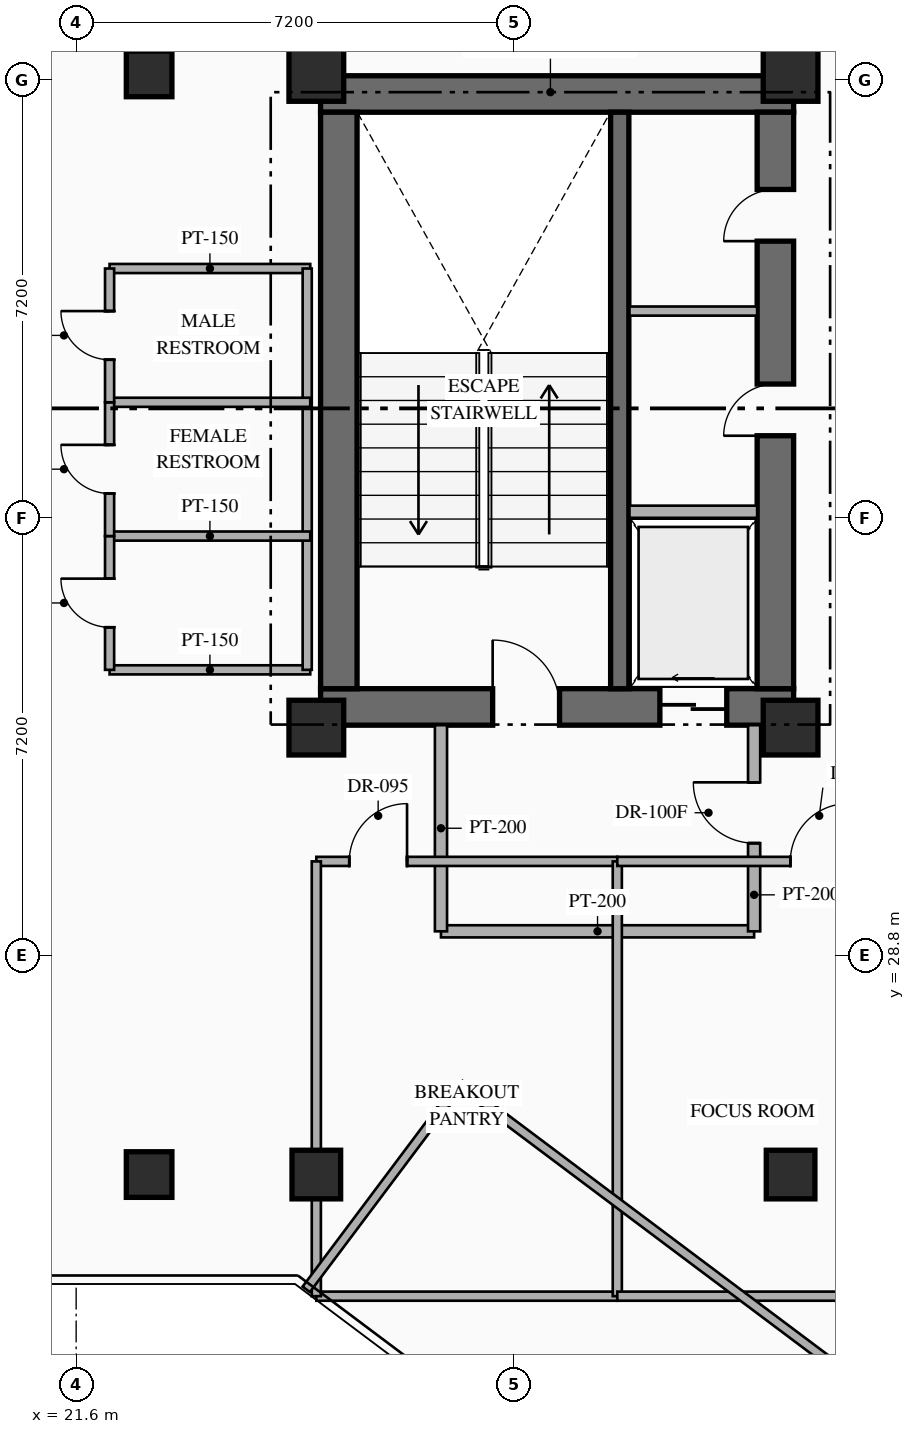
"""IFC4 building model, lengths in metres.
Left out: names, types, materials, properties, quantities, classifications, styles, units other than length and angle.
Written with IfcOpenShell. Run it as: python <this file> out.ifc"""

import sys

from ifc_helpers import new_model, si_unit, direction, frame, frame_2d, origin, origin_2d, place, context, subcontext, project, spatial, rectangle, hollow_rectangle, extrude, element, fill, save


model = new_model("IFC4")
c1 = context("Model", 3, precision=1e-05, world=origin(), true_north=direction((0.0, 1.0)))
c2 = subcontext(c1, "Body", "Model", "MODEL_VIEW")
j1 = project(units=[si_unit("LENGTHUNIT", "METRE"), si_unit("PLANEANGLEUNIT", "RADIAN")], contexts=[c1])
p1 = place(None, origin())
s1 = spatial("IfcSite", under=j1, at=p1, CompositionType="ELEMENT")
p2 = place(p1, origin())
s2 = spatial("IfcBuilding", under=s1, at=p2, CompositionType="ELEMENT")
p3 = place(p2, frame((0.0, 0.0, 178.05)))
s3 = spatial("IfcBuildingStorey", under=s2, at=p3, CompositionType="ELEMENT", Elevation=178.05)
p4 = place(p3, frame((25.62, 32.89, 0.0), z_axis=(0.0, 0.0, 1.0), x_axis=(1.0, 0.0, 0.0)))
e1 = element("IfcWall", 1, at=p4, inside=s3, PredefinedType="SHEAR", context=c2, shape_type="SweptSolid", body=[
    extrude(rectangle(XDim=7.78, YDim=0.6, at=frame_2d((3.89, 0.0))), origin(), (0.0, 0.0, 1.0), 3.6),
])
p5 = place(p4, frame((2.83, 0.0, 0.0)))
e2 = element("IfcOpeningElement", 2, at=p5, cuts=e1, PredefinedType="OPENING", context=c2, shape_type="SweptSolid", body=[
    extrude(rectangle(XDim=1.1, YDim=2.2, at=frame_2d((0.55, 1.1))), frame((0.0, 0.31, 0.0), z_axis=(0.0, -1.0, 0.0), x_axis=(1.0, 0.0, 0.0)), (0.0, 0.0, 1.0), 0.62),
])
p6 = place(p4, frame((5.58, 0.0, 0.0)))
e3 = element("IfcOpeningElement", 3, at=p6, cuts=e1, PredefinedType="OPENING", context=c2, shape_type="SweptSolid", body=[
    extrude(rectangle(XDim=1.1, YDim=2.15, at=frame_2d((0.55, 1.075))), frame((0.0, 0.31, 0.0), z_axis=(0.0, -1.0, 0.0), x_axis=(1.0, 0.0, 0.0)), (0.0, 0.0, 1.0), 0.62),
])
p7 = place(p3, frame((25.62, 42.97, 0.0), z_axis=(0.0, 0.0, 1.0), x_axis=(1.0, 0.0, 0.0)))
e4 = element("IfcWall", 4, at=p7, inside=s3, PredefinedType="SHEAR", context=c2, shape_type="SweptSolid", body=[
    extrude(rectangle(XDim=7.78, YDim=0.6, at=frame_2d((3.89, 0.0))), origin(), (0.0, 0.0, 1.0), 3.6),
])
p8 = place(p3, frame((25.92, 33.19, 0.0), z_axis=(0.0, 0.0, 1.0), x_axis=(0.0, 1.0, 0.0)))
e5 = element("IfcWall", 5, at=p8, inside=s3, PredefinedType="SHEAR", context=c2, shape_type="SweptSolid", body=[
    extrude(rectangle(XDim=9.48, YDim=0.6, at=frame_2d((4.74, 0.0))), origin(), (0.0, 0.0, 1.0), 3.6),
])
p9 = place(p3, frame((33.1, 33.19, 0.0), z_axis=(0.0, 0.0, 1.0), x_axis=(0.0, 1.0, 0.0)))
e6 = element("IfcWall", 6, at=p9, inside=s3, PredefinedType="SHEAR", context=c2, shape_type="SweptSolid", body=[
    extrude(rectangle(XDim=9.48, YDim=0.6, at=frame_2d((4.74, 0.0))), origin(), (0.0, 0.0, 1.0), 3.6),
])
p10 = place(p9, frame((4.16, 0.0, 0.0)))
e7 = element("IfcOpeningElement", 7, at=p10, cuts=e6, PredefinedType="OPENING", context=c2, shape_type="SweptSolid", body=[
    extrude(rectangle(XDim=0.85, YDim=2.08, at=frame_2d((0.425, 1.04))), frame((0.0, 0.31, 0.0), z_axis=(0.0, -1.0, 0.0), x_axis=(1.0, 0.0, 0.0)), (0.0, 0.0, 1.0), 0.62),
])
p11 = place(p9, frame((7.36, 0.0, 0.0)))
e8 = element("IfcOpeningElement", 8, at=p11, cuts=e6, PredefinedType="OPENING", context=c2, shape_type="SweptSolid", body=[
    extrude(rectangle(XDim=0.85, YDim=2.08, at=frame_2d((0.425, 1.04))), frame((0.0, 0.31, 0.0), z_axis=(0.0, -1.0, 0.0), x_axis=(1.0, 0.0, 0.0)), (0.0, 0.0, 1.0), 0.62),
])
p12 = place(p3, frame((30.54, 33.19, 0.0), z_axis=(0.0, 0.0, 1.0), x_axis=(0.0, 1.0, 0.0)))
e9 = element("IfcWall", 9, at=p12, inside=s3, PredefinedType="SHEAR", context=c2, shape_type="SweptSolid", body=[
    extrude(rectangle(XDim=9.48, YDim=0.3, at=frame_2d((4.74, 0.0))), origin(), (0.0, 0.0, 1.0), 3.6),
])
for number, where, z_axis, x_axis in (
    (10, (25.55, 32.55, 0.0), (0.0, 0.0, 1.0), (1.0, 0.0, 0.0)),
    (11, (33.35, 32.55, 0.0), (0.0, 0.0, 1.0), (1.0, 0.0, 0.0)),
    (12, (25.55, 43.3, 0.0), (0.0, 0.0, 1.0), (1.0, 0.0, 0.0)),
    (13, (33.35, 43.3, 0.0), (0.0, 0.0, 1.0), (1.0, 0.0, 0.0)),
):
    element("IfcColumn", number, at=place(p3, frame(where, z_axis=z_axis, x_axis=x_axis)), inside=s3, PredefinedType="COLUMN", context=c2, shape_type="SweptSolid", body=[
        extrude(rectangle(XDim=0.9, YDim=0.9, at=origin_2d()), origin(), (0.0, 0.0, 1.0), 3.6),
    ])
for number, where, z_axis, x_axis in (
    (14, (25.55, 25.2, 0.0), (0.0, 0.0, 1.0), (1.0, 0.0, 0.0)),
    (15, (33.35, 25.2, 0.0), (0.0, 0.0, 1.0), (1.0, 0.0, 0.0)),
):
    element("IfcColumn", number, at=place(p3, frame(where, z_axis=z_axis, x_axis=x_axis)), inside=s3, PredefinedType="COLUMN", context=c2, shape_type="SweptSolid", body=[
        extrude(hollow_rectangle(XDim=0.8, YDim=0.8, WallThickness=0.032, at=origin_2d()), origin(), (0.0, 0.0, 1.0), 3.6),
    ])
for number, where, z_axis, x_axis in (
    (16, (22.8, 25.2, 0.0), (0.0, 0.0, 1.0), (1.0, 0.0, 0.0)),
    (17, (22.8, 43.3, 0.0), (0.0, 0.0, 1.0), (1.0, 0.0, 0.0)),
):
    element("IfcColumn", number, at=place(p3, frame(where, z_axis=z_axis, x_axis=x_axis)), inside=s3, PredefinedType="COLUMN", context=c2, shape_type="SweptSolid", body=[
        extrude(hollow_rectangle(XDim=0.75, YDim=0.75, WallThickness=0.028, at=origin_2d()), origin(), (0.0, 0.0, 1.0), 3.6),
    ])
p13 = place(p3, frame((30.7, 36.1, 0.0), z_axis=(0.0, 0.0, 1.0), x_axis=(1.0, 0.0, 0.0)))
e18 = element("IfcWall", 18, at=p13, inside=s3, PredefinedType="STANDARD", context=c2, shape_type="SweptSolid", body=[
    extrude(rectangle(XDim=2.1, YDim=0.2, at=frame_2d((1.05, 0.0))), origin(), (0.0, 0.0, 1.0), 3.3),
])
p14 = place(p3, frame((30.7, 39.4, 0.0), z_axis=(0.0, 0.0, 1.0), x_axis=(1.0, 0.0, 0.0)))
e19 = element("IfcWall", 19, at=p14, inside=s3, PredefinedType="PARTITIONING", context=c2, shape_type="SweptSolid", body=[
    extrude(rectangle(XDim=2.1, YDim=0.15, at=frame_2d((1.05, 0.0))), origin(), (0.0, 0.0, 1.0), 3.3),
])
p15 = place(p3, frame((27.6, 29.2, 0.0), z_axis=(0.0, 0.0, 1.0), x_axis=(1.0, 0.0, 0.0)))
e20 = element("IfcWall", 20, at=p15, inside=s3, PredefinedType="STANDARD", context=c2, shape_type="SweptSolid", body=[
    extrude(rectangle(XDim=5.15, YDim=0.2, at=frame_2d((2.575, 0.0))), origin(), (0.0, 0.0, 1.0), 3.3),
])
p16 = place(p3, frame((27.6, 29.2, 0.0), z_axis=(0.0, 0.0, 1.0), x_axis=(0.0, 1.0, 0.0)))
e21 = element("IfcWall", 21, at=p16, inside=s3, PredefinedType="STANDARD", context=c2, shape_type="SweptSolid", body=[
    extrude(rectangle(XDim=3.39, YDim=0.2, at=frame_2d((1.695, 0.0))), origin(), (0.0, 0.0, 1.0), 3.3),
])
p17 = place(p3, frame((32.75, 29.2, 0.0), z_axis=(0.0, 0.0, 1.0), x_axis=(0.0, 1.0, 0.0)))
e22 = element("IfcWall", 22, at=p17, inside=s3, PredefinedType="STANDARD", context=c2, shape_type="SweptSolid", body=[
    extrude(rectangle(XDim=3.39, YDim=0.2, at=frame_2d((1.695, 0.0))), origin(), (0.0, 0.0, 1.0), 3.3),
])
p18 = place(p17, frame((1.45, 0.0, 0.0)))
e23 = element("IfcOpeningElement", 23, at=p18, cuts=e22, PredefinedType="OPENING", context=c2, shape_type="SweptSolid", body=[
    extrude(rectangle(XDim=1.0, YDim=2.2, at=frame_2d((0.5, 1.1))), frame((0.0, 0.11, 0.0), z_axis=(0.0, -1.0, 0.0), x_axis=(1.0, 0.0, 0.0)), (0.0, 0.0, 1.0), 0.22),
])
for number, where, z_axis, x_axis in (
    (24, (22.15, 33.5, 0.0), (0.0, 0.0, 1.0), (1.0, 0.0, 0.0)),
    (25, (22.15, 40.1, 0.0), (0.0, 0.0, 1.0), (1.0, 0.0, 0.0)),
):
    element("IfcWall", number, at=place(p3, frame(where, z_axis=z_axis, x_axis=x_axis)), inside=s3, PredefinedType="PARTITIONING", context=c2, shape_type="SweptSolid", body=[
        extrude(rectangle(XDim=3.3, YDim=0.15, at=frame_2d((1.65, 0.0))), origin(), (0.0, 0.0, 1.0), 3.3),
    ])
p19 = place(p3, frame((25.4, 33.5, 0.0), z_axis=(0.0, 0.0, 1.0), x_axis=(0.0, 1.0, 0.0)))
e26 = element("IfcWall", 26, at=p19, inside=s3, PredefinedType="PARTITIONING", context=c2, shape_type="SweptSolid", body=[
    extrude(rectangle(XDim=6.6, YDim=0.15, at=frame_2d((3.3, 0.0))), origin(), (0.0, 0.0, 1.0), 3.3),
])
for number, where, z_axis, x_axis in (
    (27, (22.15, 35.7, 0.0), (0.0, 0.0, 1.0), (1.0, 0.0, 0.0)),
    (28, (22.15, 37.9, 0.0), (0.0, 0.0, 1.0), (1.0, 0.0, 0.0)),
):
    element("IfcWall", number, at=place(p3, frame(where, z_axis=z_axis, x_axis=x_axis)), inside=s3, PredefinedType="PARTITIONING", context=c2, shape_type="SweptSolid", body=[
        extrude(rectangle(XDim=3.3, YDim=0.15, at=frame_2d((1.65, 0.0))), origin(), (0.0, 0.0, 1.0), 3.3),
    ])
p20 = place(p3, frame((22.15, 33.5, 0.0), z_axis=(0.0, 0.0, 1.0), x_axis=(0.0, 1.0, 0.0)))
e29 = element("IfcWall", 29, at=p20, inside=s3, PredefinedType="PARTITIONING", context=c2, shape_type="SweptSolid", body=[
    extrude(rectangle(XDim=2.2, YDim=0.15, at=frame_2d((1.1, 0.0))), origin(), (0.0, 0.0, 1.0), 3.3),
])
p21 = place(p20, frame((0.7, 0.0, 0.0)))
e30 = element("IfcOpeningElement", 30, at=p21, cuts=e29, PredefinedType="OPENING", context=c2, shape_type="SweptSolid", body=[
    extrude(rectangle(XDim=0.8, YDim=2.06, at=frame_2d((0.4, 1.03))), frame((0.0, 0.085, 0.0), z_axis=(0.0, -1.0, 0.0), x_axis=(1.0, 0.0, 0.0)), (0.0, 0.0, 1.0), 0.17),
])
p22 = place(p3, frame((22.15, 35.7, 0.0), z_axis=(0.0, 0.0, 1.0), x_axis=(0.0, 1.0, 0.0)))
e31 = element("IfcWall", 31, at=p22, inside=s3, PredefinedType="PARTITIONING", context=c2, shape_type="SweptSolid", body=[
    extrude(rectangle(XDim=2.2, YDim=0.15, at=frame_2d((1.1, 0.0))), origin(), (0.0, 0.0, 1.0), 3.3),
])
p23 = place(p22, frame((0.7, 0.0, 0.0)))
e32 = element("IfcOpeningElement", 32, at=p23, cuts=e31, PredefinedType="OPENING", context=c2, shape_type="SweptSolid", body=[
    extrude(rectangle(XDim=0.8, YDim=2.06, at=frame_2d((0.4, 1.03))), frame((0.0, 0.085, 0.0), z_axis=(0.0, -1.0, 0.0), x_axis=(1.0, 0.0, 0.0)), (0.0, 0.0, 1.0), 0.17),
])
p24 = place(p3, frame((22.15, 37.9, 0.0), z_axis=(0.0, 0.0, 1.0), x_axis=(0.0, 1.0, 0.0)))
e33 = element("IfcWall", 33, at=p24, inside=s3, PredefinedType="PARTITIONING", context=c2, shape_type="SweptSolid", body=[
    extrude(rectangle(XDim=2.2, YDim=0.15, at=frame_2d((1.1, 0.0))), origin(), (0.0, 0.0, 1.0), 3.3),
])
p25 = place(p24, frame((0.7, 0.0, 0.0)))
e34 = element("IfcOpeningElement", 34, at=p25, cuts=e33, PredefinedType="OPENING", context=c2, shape_type="SweptSolid", body=[
    extrude(rectangle(XDim=0.8, YDim=2.06, at=frame_2d((0.4, 1.03))), frame((0.0, 0.085, 0.0), z_axis=(0.0, -1.0, 0.0), x_axis=(1.0, 0.0, 0.0)), (0.0, 0.0, 1.0), 0.17),
])
p26 = place(p3, frame((25.55, 23.2, 0.0), z_axis=(0.0, 0.0, 1.0), x_axis=(1.0, 0.0, 0.0)))
e35 = element("IfcWall", 35, at=p26, inside=s3, PredefinedType="PARTITIONING", context=c2, shape_type="SweptSolid", body=[
    extrude(rectangle(XDim=4.95, YDim=0.15, at=frame_2d((2.475, 0.0))), origin(), (0.0, 0.0, 1.0), 3.3),
])
p27 = place(p3, frame((25.55, 30.35, 0.0), z_axis=(0.0, 0.0, 1.0), x_axis=(1.0, 0.0, 0.0)))
e36 = element("IfcWall", 36, at=p27, inside=s3, PredefinedType="PARTITIONING", context=c2, shape_type="SweptSolid", body=[
    extrude(rectangle(XDim=4.95, YDim=0.15, at=frame_2d((2.475, 0.0))), origin(), (0.0, 0.0, 1.0), 3.3),
])
p28 = place(p27, frame((0.542, 0.0, 0.0)))
e37 = element("IfcOpeningElement", 37, at=p28, cuts=e36, PredefinedType="OPENING", context=c2, shape_type="SweptSolid", body=[
    extrude(rectangle(XDim=0.95, YDim=2.15, at=frame_2d((0.475, 1.075))), frame((0.0, 0.085, 0.0), z_axis=(0.0, -1.0, 0.0), x_axis=(1.0, 0.0, 0.0)), (0.0, 0.0, 1.0), 0.17),
])
p29 = place(p3, frame((25.55, 23.2, 0.0), z_axis=(0.0, 0.0, 1.0), x_axis=(0.0, 1.0, 0.0)))
e38 = element("IfcWall", 38, at=p29, inside=s3, PredefinedType="PARTITIONING", context=c2, shape_type="SweptSolid", body=[
    extrude(rectangle(XDim=7.15, YDim=0.15, at=frame_2d((3.575, 0.0))), origin(), (0.0, 0.0, 1.0), 2.645),
])
p30 = place(p3, frame((30.5, 23.2, 0.0), z_axis=(0.0, 0.0, 1.0), x_axis=(0.0, 1.0, 0.0)))
e39 = element("IfcWall", 39, at=p30, inside=s3, PredefinedType="PARTITIONING", context=c2, shape_type="SweptSolid", body=[
    extrude(rectangle(XDim=7.15, YDim=0.15, at=frame_2d((3.575, 0.0))), origin(), (0.0, 0.0, 1.0), 3.3),
])
p31 = place(p3, frame((30.5, 23.2, 0.0), z_axis=(0.0, 0.0, 1.0), x_axis=(1.0, 0.0, 0.0)))
e40 = element("IfcWall", 40, at=p31, inside=s3, PredefinedType="PARTITIONING", context=c2, shape_type="SweptSolid", body=[
    extrude(rectangle(XDim=4.45, YDim=0.15, at=frame_2d((2.225, 0.0))), origin(), (0.0, 0.0, 1.0), 3.3),
])
p32 = place(p3, frame((30.5, 30.35, 0.0), z_axis=(0.0, 0.0, 1.0), x_axis=(1.0, 0.0, 0.0)))
e41 = element("IfcWall", 41, at=p32, inside=s3, PredefinedType="PARTITIONING", context=c2, shape_type="SweptSolid", body=[
    extrude(rectangle(XDim=4.45, YDim=0.15, at=frame_2d((2.225, 0.0))), origin(), (0.0, 0.0, 1.0), 3.3),
])
p33 = place(p32, frame((2.846, 0.0, 0.0)))
e42 = element("IfcOpeningElement", 42, at=p33, cuts=e41, PredefinedType="OPENING", context=c2, shape_type="SweptSolid", body=[
    extrude(rectangle(XDim=0.95, YDim=2.15, at=frame_2d((0.475, 1.075))), frame((0.0, 0.085, 0.0), z_axis=(0.0, -1.0, 0.0), x_axis=(1.0, 0.0, 0.0)), (0.0, 0.0, 1.0), 0.17),
])
p34 = place(p3, frame((27.91, 26.68, 0.0), z_axis=(0.0, 0.0, 1.0), x_axis=(0.800005938517, -0.599992081896, 0.0)))
e43 = element("IfcWall", 43, at=p34, inside=s3, PredefinedType="PARTITIONING", context=c2, shape_type="SweptSolid", body=[
    extrude(rectangle(XDim=14.8, YDim=0.15, at=frame_2d((7.4, 0.0))), origin(), (0.0, 0.0, 1.0), 3.3),
])
p35 = place(p34, frame((9.281, 0.0, 0.0)))
e44 = element("IfcOpeningElement", 44, at=p35, cuts=e43, PredefinedType="OPENING", context=c2, shape_type="SweptSolid", body=[
    extrude(rectangle(XDim=0.95, YDim=2.15, at=frame_2d((0.475, 1.075))), frame((0.0, 0.085, 0.0), z_axis=(0.0, -1.0, 0.0), x_axis=(1.0, 0.0, 0.0)), (0.0, 0.0, 1.0), 0.17),
])
p36 = place(p3, frame((25.384, 23.312, 0.0), z_axis=(0.0, 0.0, 1.0), x_axis=(0.599990721155, 0.80000695905, 0.0)))
e45 = element("IfcWall", 45, at=p36, inside=s3, PredefinedType="PARTITIONING", context=c2, shape_type="SweptSolid", body=[
    extrude(rectangle(XDim=4.21, YDim=0.15, at=frame_2d((2.105, 0.0))), origin(), (0.0, 0.0, 1.0), 3.3),
])
p37 = place(p5, origin())
e46 = element("IfcDoor", 46, at=p37, inside=s3, OperationType="SINGLE_SWING_LEFT", PredefinedType="DOOR", context=c2, shape_type="SweptSolid", body=[
    extrude(rectangle(XDim=1.1, YDim=2.2, at=frame_2d((0.55, 1.1))), frame((0.0, 0.025, 0.0), z_axis=(0.0, -1.0, 0.0), x_axis=(1.0, 0.0, 0.0)), (0.0, 0.0, 1.0), 0.05),
])
fill(e2, e46)
p38 = place(p6, origin())
e47 = element("IfcDoor", 47, at=p38, inside=s3, OperationType="SLIDING_TO_LEFT", PredefinedType="USERDEFINED", context=c2, shape_type="SweptSolid", body=[
    extrude(rectangle(XDim=1.1, YDim=2.15, at=frame_2d((0.55, 1.075))), frame((0.0, 0.025, 0.0), z_axis=(0.0, -1.0, 0.0), x_axis=(1.0, 0.0, 0.0)), (0.0, 0.0, 1.0), 0.05),
])
fill(e3, e47)
p39 = place(p10, origin())
e48 = element("IfcDoor", 48, at=p39, inside=s3, OperationType="SINGLE_SWING_LEFT", PredefinedType="DOOR", context=c2, shape_type="SweptSolid", body=[
    extrude(rectangle(XDim=0.85, YDim=2.08, at=frame_2d((0.425, 1.04))), frame((0.0, 0.025, 0.0), z_axis=(0.0, -1.0, 0.0), x_axis=(1.0, 0.0, 0.0)), (0.0, 0.0, 1.0), 0.05),
])
fill(e7, e48)
p40 = place(p11, origin())
e49 = element("IfcDoor", 49, at=p40, inside=s3, OperationType="SINGLE_SWING_LEFT", PredefinedType="DOOR", context=c2, shape_type="SweptSolid", body=[
    extrude(rectangle(XDim=0.85, YDim=2.08, at=frame_2d((0.425, 1.04))), frame((0.0, 0.025, 0.0), z_axis=(0.0, -1.0, 0.0), x_axis=(1.0, 0.0, 0.0)), (0.0, 0.0, 1.0), 0.05),
])
fill(e8, e49)
p41 = place(p18, origin())
e50 = element("IfcDoor", 50, at=p41, inside=s3, OperationType="SINGLE_SWING_RIGHT", PredefinedType="DOOR", context=c2, shape_type="SweptSolid", body=[
    extrude(rectangle(XDim=1.0, YDim=2.2, at=frame_2d((0.5, 1.1))), frame((0.0, 0.025, 0.0), z_axis=(0.0, -1.0, 0.0), x_axis=(1.0, 0.0, 0.0)), (0.0, 0.0, 1.0), 0.05),
])
fill(e23, e50)
p42 = place(p21, origin())
e51 = element("IfcDoor", 51, at=p42, inside=s3, OperationType="SINGLE_SWING_RIGHT", PredefinedType="DOOR", context=c2, shape_type="SweptSolid", body=[
    extrude(rectangle(XDim=0.8, YDim=2.06, at=frame_2d((0.4, 1.03))), frame((0.0, 0.025, 0.0), z_axis=(0.0, -1.0, 0.0), x_axis=(1.0, 0.0, 0.0)), (0.0, 0.0, 1.0), 0.05),
])
fill(e30, e51)
p43 = place(p23, origin())
e52 = element("IfcDoor", 52, at=p43, inside=s3, OperationType="SINGLE_SWING_RIGHT", PredefinedType="DOOR", context=c2, shape_type="SweptSolid", body=[
    extrude(rectangle(XDim=0.8, YDim=2.06, at=frame_2d((0.4, 1.03))), frame((0.0, 0.025, 0.0), z_axis=(0.0, -1.0, 0.0), x_axis=(1.0, 0.0, 0.0)), (0.0, 0.0, 1.0), 0.05),
])
fill(e32, e52)
p44 = place(p25, origin())
e53 = element("IfcDoor", 53, at=p44, inside=s3, OperationType="SINGLE_SWING_RIGHT", PredefinedType="DOOR", context=c2, shape_type="SweptSolid", body=[
    extrude(rectangle(XDim=0.8, YDim=2.06, at=frame_2d((0.4, 1.03))), frame((0.0, 0.025, 0.0), z_axis=(0.0, -1.0, 0.0), x_axis=(1.0, 0.0, 0.0)), (0.0, 0.0, 1.0), 0.05),
])
fill(e34, e53)
p45 = place(p28, origin())
e54 = element("IfcDoor", 54, at=p45, inside=s3, OperationType="SINGLE_SWING_RIGHT", PredefinedType="DOOR", context=c2, shape_type="SweptSolid", body=[
    extrude(rectangle(XDim=0.95, YDim=2.15, at=frame_2d((0.475, 1.075))), frame((0.0, 0.025, 0.0), z_axis=(0.0, -1.0, 0.0), x_axis=(1.0, 0.0, 0.0)), (0.0, 0.0, 1.0), 0.05),
])
fill(e37, e54)
p46 = place(p33, origin())
e55 = element("IfcDoor", 55, at=p46, inside=s3, OperationType="SINGLE_SWING_RIGHT", PredefinedType="DOOR", context=c2, shape_type="SweptSolid", body=[
    extrude(rectangle(XDim=0.95, YDim=2.15, at=frame_2d((0.475, 1.075))), frame((0.0, 0.025, 0.0), z_axis=(0.0, -1.0, 0.0), x_axis=(1.0, 0.0, 0.0)), (0.0, 0.0, 1.0), 0.05),
])
fill(e42, e55)
save(model, sys.argv[1])
